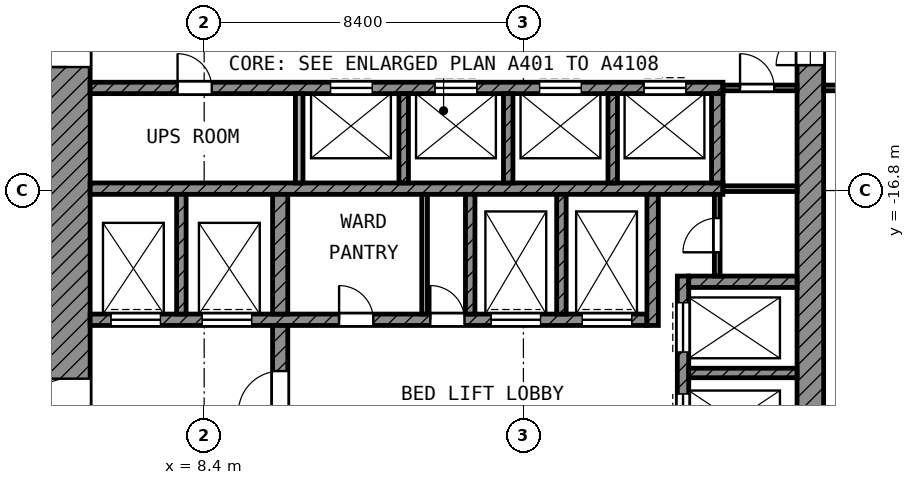
"""IFC4 building model, lengths in metres.
Left out: names, types, materials, properties, quantities, classifications, styles, units other than length and angle.
Written with IfcOpenShell. Run it as: python <this file> out.ifc"""

import sys

from ifc_helpers import new_model, si_unit, direction, frame, frame_2d, origin, place, context, subcontext, project, spatial, rectangle, extrude, element, fill, save


model = new_model("IFC4")
c1 = context("Model", 3, precision=1e-05, world=origin(), true_north=direction((0.0, 1.0)))
c2 = subcontext(c1, "Body", "Model", "MODEL_VIEW")
j1 = project(units=[si_unit("LENGTHUNIT", "METRE"), si_unit("PLANEANGLEUNIT", "RADIAN")], contexts=[c1])
p1 = place(None, origin())
s1 = spatial("IfcSite", under=j1, at=p1, CompositionType="ELEMENT")
p2 = place(p1, origin())
s2 = spatial("IfcBuilding", under=s1, at=p2, CompositionType="ELEMENT")
p3 = place(p2, frame((0.0, 0.0, 307.0)))
s3 = spatial("IfcBuildingStorey", under=s2, at=p3, CompositionType="ELEMENT", Elevation=307.0)
p4 = place(p3, frame((4.8, -24.7, 0.0), z_axis=(0.0, 0.0, 1.0), x_axis=(0.0, 1.0, 0.0)))
e1 = element("IfcWall", 1, at=p4, inside=s3, PredefinedType="SHEAR", context=c2, shape_type="SweptSolid", body=[
    extrude(rectangle(XDim=19.3, YDim=1.2, at=frame_2d((9.65, 0.0))), origin(), (0.0, 0.0, 1.0), 3.6),
])
p5 = place(p4, frame((11.15, 0.0, 0.0)))
e2 = element("IfcOpeningElement", 2, at=p5, cuts=e1, PredefinedType="OPENING", context=c2, shape_type="SweptSolid", body=[
    extrude(rectangle(XDim=1.1, YDim=2.1, at=frame_2d((0.55, 1.05))), frame((0.0, 0.61, 0.0), z_axis=(0.0, -1.0, 0.0), x_axis=(1.0, 0.0, 0.0)), (0.0, 0.0, 1.0), 1.22),
])
p6 = place(p4, frame((1.85, 0.0, 0.0)))
e3 = element("IfcOpeningElement", 3, at=p6, cuts=e1, PredefinedType="OPENING", context=c2, shape_type="SweptSolid", body=[
    extrude(rectangle(XDim=1.1, YDim=2.1, at=frame_2d((0.55, 1.05))), frame((0.0, 0.61, 0.0), z_axis=(0.0, -1.0, 0.0), x_axis=(1.0, 0.0, 0.0)), (0.0, 0.0, 1.0), 1.22),
])
p7 = place(p3, frame((24.35, -24.0, 0.0), z_axis=(0.0, 0.0, 1.0), x_axis=(0.0, 1.0, 0.0)))
e4 = element("IfcWall", 4, at=p7, inside=s3, PredefinedType="SHEAR", context=c2, shape_type="SweptSolid", body=[
    extrude(rectangle(XDim=18.6, YDim=0.7, at=frame_2d((9.3, 0.0))), origin(), (0.0, 0.0, 1.0), 3.6),
])
p8 = place(p7, frame((10.5, 0.0, 0.0)))
e5 = element("IfcOpeningElement", 5, at=p8, cuts=e4, PredefinedType="OPENING", context=c2, shape_type="SweptSolid", body=[
    extrude(rectangle(XDim=1.8, YDim=2.1, at=frame_2d((0.9, 1.05))), frame((0.0, 0.36, 0.0), z_axis=(0.0, -1.0, 0.0), x_axis=(1.0, 0.0, 0.0)), (0.0, 0.0, 1.0), 0.72),
])
p9 = place(p3, frame((5.4, -14.1, 0.0), z_axis=(0.0, 0.0, 1.0), x_axis=(1.0, 0.0, 0.0)))
e6 = element("IfcWall", 6, at=p9, inside=s3, PredefinedType="SHEAR", context=c2, shape_type="SweptSolid", body=[
    extrude(rectangle(XDim=16.65, YDim=0.3, at=frame_2d((8.325, 0.0))), origin(), (0.0, 0.0, 1.0), 3.6),
])
p10 = place(p9, frame((6.325, 0.0, 0.0)))
e7 = element("IfcOpeningElement", 7, at=p10, cuts=e6, PredefinedType="OPENING", context=c2, shape_type="SweptSolid", body=[
    extrude(rectangle(XDim=1.1, YDim=2.1, at=frame_2d((0.55, 1.05))), frame((0.0, 0.16, 0.0), z_axis=(0.0, -1.0, 0.0), x_axis=(1.0, 0.0, 0.0)), (0.0, 0.0, 1.0), 0.32),
])
p11 = place(p9, frame((9.075, 0.0, 0.0)))
e8 = element("IfcOpeningElement", 8, at=p11, cuts=e6, PredefinedType="OPENING", context=c2, shape_type="SweptSolid", body=[
    extrude(rectangle(XDim=1.1, YDim=2.1, at=frame_2d((0.55, 1.05))), frame((0.0, 0.16, 0.0), z_axis=(0.0, -1.0, 0.0), x_axis=(1.0, 0.0, 0.0)), (0.0, 0.0, 1.0), 0.32),
])
p12 = place(p9, frame((11.825, 0.0, 0.0)))
e9 = element("IfcOpeningElement", 9, at=p12, cuts=e6, PredefinedType="OPENING", context=c2, shape_type="SweptSolid", body=[
    extrude(rectangle(XDim=1.1, YDim=2.1, at=frame_2d((0.55, 1.05))), frame((0.0, 0.16, 0.0), z_axis=(0.0, -1.0, 0.0), x_axis=(1.0, 0.0, 0.0)), (0.0, 0.0, 1.0), 0.32),
])
p13 = place(p9, frame((14.575, 0.0, 0.0)))
e10 = element("IfcOpeningElement", 10, at=p13, cuts=e6, PredefinedType="OPENING", context=c2, shape_type="SweptSolid", body=[
    extrude(rectangle(XDim=1.1, YDim=2.1, at=frame_2d((0.55, 1.05))), frame((0.0, 0.16, 0.0), z_axis=(0.0, -1.0, 0.0), x_axis=(1.0, 0.0, 0.0)), (0.0, 0.0, 1.0), 0.32),
])
p14 = place(p9, frame((2.3, 0.0, 0.0)))
e11 = element("IfcOpeningElement", 11, at=p14, cuts=e6, PredefinedType="OPENING", context=c2, shape_type="SweptSolid", body=[
    extrude(rectangle(XDim=0.9, YDim=2.1, at=frame_2d((0.45, 1.05))), frame((0.0, 0.16, 0.0), z_axis=(0.0, -1.0, 0.0), x_axis=(1.0, 0.0, 0.0)), (0.0, 0.0, 1.0), 0.32),
])
p15 = place(p3, frame((5.4, -16.75, 0.0), z_axis=(0.0, 0.0, 1.0), x_axis=(1.0, 0.0, 0.0)))
e12 = element("IfcWall", 12, at=p15, inside=s3, PredefinedType="SHEAR", context=c2, shape_type="SweptSolid", body=[
    extrude(rectangle(XDim=16.65, YDim=0.3, at=frame_2d((8.325, 0.0))), origin(), (0.0, 0.0, 1.0), 3.6),
])
p16 = place(p3, frame((5.4, -20.2, 0.0), z_axis=(0.0, 0.0, 1.0), x_axis=(1.0, 0.0, 0.0)))
e13 = element("IfcWall", 13, at=p16, inside=s3, PredefinedType="SHEAR", context=c2, shape_type="SweptSolid", body=[
    extrude(rectangle(XDim=14.65, YDim=0.3, at=frame_2d((7.325, 0.0))), origin(), (0.0, 0.0, 1.0), 3.6),
])
p17 = place(p16, frame((10.55, 0.0, 0.0)))
e14 = element("IfcOpeningElement", 14, at=p17, cuts=e13, PredefinedType="OPENING", context=c2, shape_type="SweptSolid", body=[
    extrude(rectangle(XDim=1.3, YDim=2.1, at=frame_2d((0.65, 1.05))), frame((0.0, 0.16, 0.0), z_axis=(0.0, -1.0, 0.0), x_axis=(1.0, 0.0, 0.0)), (0.0, 0.0, 1.0), 0.32),
])
p18 = place(p16, frame((12.95, 0.0, 0.0)))
e15 = element("IfcOpeningElement", 15, at=p18, cuts=e13, PredefinedType="OPENING", context=c2, shape_type="SweptSolid", body=[
    extrude(rectangle(XDim=1.3, YDim=2.1, at=frame_2d((0.65, 1.05))), frame((0.0, 0.16, 0.0), z_axis=(0.0, -1.0, 0.0), x_axis=(1.0, 0.0, 0.0)), (0.0, 0.0, 1.0), 0.32),
])
p19 = place(p16, frame((0.55, 0.0, 0.0)))
e16 = element("IfcOpeningElement", 16, at=p19, cuts=e13, PredefinedType="OPENING", context=c2, shape_type="SweptSolid", body=[
    extrude(rectangle(XDim=1.3, YDim=2.1, at=frame_2d((0.65, 1.05))), frame((0.0, 0.16, 0.0), z_axis=(0.0, -1.0, 0.0), x_axis=(1.0, 0.0, 0.0)), (0.0, 0.0, 1.0), 0.32),
])
p20 = place(p16, frame((2.95, 0.0, 0.0)))
e17 = element("IfcOpeningElement", 17, at=p20, cuts=e13, PredefinedType="OPENING", context=c2, shape_type="SweptSolid", body=[
    extrude(rectangle(XDim=1.3, YDim=2.1, at=frame_2d((0.65, 1.05))), frame((0.0, 0.16, 0.0), z_axis=(0.0, -1.0, 0.0), x_axis=(1.0, 0.0, 0.0)), (0.0, 0.0, 1.0), 0.32),
])
p21 = place(p16, frame((6.55, 0.0, 0.0)))
e18 = element("IfcOpeningElement", 18, at=p21, cuts=e13, PredefinedType="OPENING", context=c2, shape_type="SweptSolid", body=[
    extrude(rectangle(XDim=0.9, YDim=2.1, at=frame_2d((0.45, 1.05))), frame((0.0, 0.16, 0.0), z_axis=(0.0, -1.0, 0.0), x_axis=(1.0, 0.0, 0.0)), (0.0, 0.0, 1.0), 0.32),
])
p22 = place(p16, frame((8.95, 0.0, 0.0)))
e19 = element("IfcOpeningElement", 19, at=p22, cuts=e13, PredefinedType="OPENING", context=c2, shape_type="SweptSolid", body=[
    extrude(rectangle(XDim=0.9, YDim=2.1, at=frame_2d((0.45, 1.05))), frame((0.0, 0.16, 0.0), z_axis=(0.0, -1.0, 0.0), x_axis=(1.0, 0.0, 0.0)), (0.0, 0.0, 1.0), 0.32),
])
p23 = place(p3, frame((10.4, -24.0, 0.0), z_axis=(0.0, 0.0, 1.0), x_axis=(0.0, 1.0, 0.0)))
e20 = element("IfcWall", 20, at=p23, inside=s3, PredefinedType="SHEAR", context=c2, shape_type="SweptSolid", body=[
    extrude(rectangle(XDim=3.65, YDim=0.4, at=frame_2d((1.825, 0.0))), origin(), (0.0, 0.0, 1.0), 3.6),
])
p24 = place(p23, frame((1.35, 0.0, 0.0)))
e21 = element("IfcOpeningElement", 21, at=p24, cuts=e20, PredefinedType="OPENING", context=c2, shape_type="SweptSolid", body=[
    extrude(rectangle(XDim=1.1, YDim=2.1, at=frame_2d((0.55, 1.05))), frame((0.0, 0.21, 0.0), z_axis=(0.0, -1.0, 0.0), x_axis=(1.0, 0.0, 0.0)), (0.0, 0.0, 1.0), 0.42),
])
p25 = place(p3, frame((10.4, -20.05, 0.0), z_axis=(0.0, 0.0, 1.0), x_axis=(0.0, 1.0, 0.0)))
e22 = element("IfcWall", 22, at=p25, inside=s3, PredefinedType="SHEAR", context=c2, shape_type="SweptSolid", body=[
    extrude(rectangle(XDim=3.15, YDim=0.4, at=frame_2d((1.575, 0.0))), origin(), (0.0, 0.0, 1.0), 3.6),
])
p26 = place(p3, frame((20.2, -20.35, 0.0), z_axis=(0.0, 0.0, 1.0), x_axis=(0.0, 1.0, 0.0)))
e23 = element("IfcWall", 23, at=p26, inside=s3, PredefinedType="SHEAR", context=c2, shape_type="SweptSolid", body=[
    extrude(rectangle(XDim=3.45, YDim=0.3, at=frame_2d((1.725, 0.0))), origin(), (0.0, 0.0, 1.0), 3.6),
])
p27 = place(p3, frame((21.9, -16.6, 0.0), z_axis=(0.0, 0.0, 1.0), x_axis=(0.0, 1.0, 0.0)))
e24 = element("IfcWall", 24, at=p27, inside=s3, PredefinedType="SHEAR", context=c2, shape_type="SweptSolid", body=[
    extrude(rectangle(XDim=2.35, YDim=0.3, at=frame_2d((1.175, 0.0))), origin(), (0.0, 0.0, 1.0), 3.6),
])
p28 = place(p3, frame((21.15, -19.2, 0.0), z_axis=(0.0, 0.0, 1.0), x_axis=(1.0, 0.0, 0.0)))
e25 = element("IfcWall", 25, at=p28, inside=s3, PredefinedType="SHEAR", context=c2, shape_type="SweptSolid", body=[
    extrude(rectangle(XDim=2.85, YDim=0.3, at=frame_2d((1.425, 0.0))), origin(), (0.0, 0.0, 1.0), 3.6),
])
p29 = place(p3, frame((21.0, -24.0, 0.0), z_axis=(0.0, 0.0, 1.0), x_axis=(0.0, 1.0, 0.0)))
e26 = element("IfcWall", 26, at=p29, inside=s3, PredefinedType="SHEAR", context=c2, shape_type="SweptSolid", body=[
    extrude(rectangle(XDim=4.95, YDim=0.3, at=frame_2d((2.475, 0.0))), origin(), (0.0, 0.0, 1.0), 3.6),
])
p30 = place(p29, frame((2.95, 0.0, 0.0)))
e27 = element("IfcOpeningElement", 27, at=p30, cuts=e26, PredefinedType="OPENING", context=c2, shape_type="SweptSolid", body=[
    extrude(rectangle(XDim=1.3, YDim=2.1, at=frame_2d((0.65, 1.05))), frame((0.0, 0.16, 0.0), z_axis=(0.0, -1.0, 0.0), x_axis=(1.0, 0.0, 0.0)), (0.0, 0.0, 1.0), 0.32),
])
p31 = place(p29, frame((0.55, 0.0, 0.0)))
e28 = element("IfcOpeningElement", 28, at=p31, cuts=e26, PredefinedType="OPENING", context=c2, shape_type="SweptSolid", body=[
    extrude(rectangle(XDim=1.3, YDim=2.1, at=frame_2d((0.65, 1.05))), frame((0.0, 0.16, 0.0), z_axis=(0.0, -1.0, 0.0), x_axis=(1.0, 0.0, 0.0)), (0.0, 0.0, 1.0), 0.32),
])
p32 = place(p3, frame((21.15, -21.6, 0.0), z_axis=(0.0, 0.0, 1.0), x_axis=(1.0, 0.0, 0.0)))
e29 = element("IfcWall", 29, at=p32, inside=s3, PredefinedType="SHEAR", context=c2, shape_type="SweptSolid", body=[
    extrude(rectangle(XDim=2.85, YDim=0.25, at=frame_2d((1.425, 0.0))), origin(), (0.0, 0.0, 1.0), 3.6),
])
for number, where, z_axis, x_axis in (
    (30, (7.8, -20.05, 0.0), (0.0, 0.0, 1.0), (0.0, 1.0, 0.0)),
    (31, (15.4, -20.05, 0.0), (0.0, 0.0, 1.0), (0.0, 1.0, 0.0)),
    (32, (17.8, -20.05, 0.0), (0.0, 0.0, 1.0), (0.0, 1.0, 0.0)),
):
    element("IfcWall", number, at=place(p3, frame(where, z_axis=z_axis, x_axis=x_axis)), inside=s3, PredefinedType="SHEAR", context=c2, shape_type="SweptSolid", body=[
        extrude(rectangle(XDim=3.15, YDim=0.25, at=frame_2d((1.575, 0.0))), origin(), (0.0, 0.0, 1.0), 3.6),
    ])
p33 = place(p3, frame((10.9, -16.6, 0.0), z_axis=(0.0, 0.0, 1.0), x_axis=(0.0, 1.0, 0.0)))
e33 = element("IfcWall", 33, at=p33, inside=s3, PredefinedType="PARTITIONING", context=c2, shape_type="SweptSolid", body=[
    extrude(rectangle(XDim=2.35, YDim=0.2, at=frame_2d((1.175, 0.0))), origin(), (0.0, 0.0, 1.0), 3.6),
])
for number, where, z_axis, x_axis in (
    (34, (13.65, -16.6, 0.0), (0.0, 0.0, 1.0), (0.0, 1.0, 0.0)),
    (35, (16.4, -16.6, 0.0), (0.0, 0.0, 1.0), (0.0, 1.0, 0.0)),
    (36, (19.15, -16.6, 0.0), (0.0, 0.0, 1.0), (0.0, 1.0, 0.0)),
):
    element("IfcWall", number, at=place(p3, frame(where, z_axis=z_axis, x_axis=x_axis)), inside=s3, PredefinedType="SHEAR", context=c2, shape_type="SweptSolid", body=[
        extrude(rectangle(XDim=2.35, YDim=0.25, at=frame_2d((1.175, 0.0))), origin(), (0.0, 0.0, 1.0), 3.6),
    ])
p34 = place(p3, frame((21.9, -19.05, 0.0), z_axis=(0.0, 0.0, 1.0), x_axis=(0.0, 1.0, 0.0)))
e37 = element("IfcWall", 37, at=p34, inside=s3, PredefinedType="PARTITIONING", context=c2, shape_type="SweptSolid", body=[
    extrude(rectangle(XDim=2.15, YDim=0.15, at=frame_2d((1.075, 0.0))), origin(), (0.0, 0.0, 1.0), 3.6),
])
p35 = place(p34, frame((0.625, 0.0, 0.0)))
e38 = element("IfcOpeningElement", 38, at=p35, cuts=e37, PredefinedType="OPENING", context=c2, shape_type="SweptSolid", body=[
    extrude(rectangle(XDim=0.9, YDim=2.1, at=frame_2d((0.45, 1.05))), frame((0.0, 0.085, 0.0), z_axis=(0.0, -1.0, 0.0), x_axis=(1.0, 0.0, 0.0)), (0.0, 0.0, 1.0), 0.17),
])
p36 = place(p3, frame((22.05, -16.75, 0.0), z_axis=(0.0, 0.0, 1.0), x_axis=(1.0, 0.0, 0.0)))
e39 = element("IfcWall", 39, at=p36, inside=s3, PredefinedType="PARTITIONING", context=c2, shape_type="SweptSolid", body=[
    extrude(rectangle(XDim=1.95, YDim=0.15, at=frame_2d((0.975, 0.0))), origin(), (0.0, 0.0, 1.0), 3.6),
])
p37 = place(p3, frame((22.05, -14.1, 0.0), z_axis=(0.0, 0.0, 1.0), x_axis=(1.0, 0.0, 0.0)))
e40 = element("IfcWall", 40, at=p37, inside=s3, PredefinedType="PARTITIONING", context=c2, shape_type="SweptSolid", body=[
    extrude(rectangle(XDim=1.95, YDim=0.15, at=frame_2d((0.975, 0.0))), origin(), (0.0, 0.0, 1.0), 3.6),
])
p38 = place(p37, frame((0.45, 0.0, 0.0)))
e41 = element("IfcOpeningElement", 41, at=p38, cuts=e40, PredefinedType="OPENING", context=c2, shape_type="SweptSolid", body=[
    extrude(rectangle(XDim=0.9, YDim=2.1, at=frame_2d((0.45, 1.05))), frame((0.0, 0.085, 0.0), z_axis=(0.0, -1.0, 0.0), x_axis=(1.0, 0.0, 0.0)), (0.0, 0.0, 1.0), 0.17),
])
p39 = place(p3, frame((14.2, -20.05, 0.0), z_axis=(0.0, 0.0, 1.0), x_axis=(0.0, 1.0, 0.0)))
e42 = element("IfcWall", 42, at=p39, inside=s3, PredefinedType="PARTITIONING", context=c2, shape_type="SweptSolid", body=[
    extrude(rectangle(XDim=3.15, YDim=0.15, at=frame_2d((1.575, 0.0))), origin(), (0.0, 0.0, 1.0), 3.6),
])
p40 = place(p3, frame((24.7, -14.1, 0.0), z_axis=(0.0, 0.0, 1.0), x_axis=(1.0, 0.0, 0.0)))
e43 = element("IfcWall", 43, at=p40, inside=s3, PredefinedType="PARTITIONING", context=c2, shape_type="SweptSolid", body=[
    extrude(rectangle(XDim=4.625, YDim=0.15, at=frame_2d((2.312, 0.0))), origin(), (0.0, 0.0, 1.0), 3.6),
])
p41 = place(p40, frame((1.85, 0.0, 0.0)))
e44 = element("IfcOpeningElement", 44, at=p41, cuts=e43, PredefinedType="OPENING", context=c2, shape_type="SweptSolid", body=[
    extrude(rectangle(XDim=1.5, YDim=2.1, at=frame_2d((0.75, 1.05))), frame((0.0, 0.085, 0.0), z_axis=(0.0, -1.0, 0.0), x_axis=(1.0, 0.0, 0.0)), (0.0, 0.0, 1.0), 0.17),
])
p42 = place(p10, origin())
e45 = element("IfcDoor", 45, at=p42, inside=s3, OperationType="DOUBLE_DOOR_SLIDING", PredefinedType="DOOR", context=c2, shape_type="SweptSolid", body=[
    extrude(rectangle(XDim=1.1, YDim=2.1, at=frame_2d((0.55, 1.05))), frame((0.0, 0.025, 0.0), z_axis=(0.0, -1.0, 0.0), x_axis=(1.0, 0.0, 0.0)), (0.0, 0.0, 1.0), 0.05),
])
fill(e7, e45)
p43 = place(p11, origin())
e46 = element("IfcDoor", 46, at=p43, inside=s3, OperationType="DOUBLE_DOOR_SLIDING", PredefinedType="DOOR", context=c2, shape_type="SweptSolid", body=[
    extrude(rectangle(XDim=1.1, YDim=2.1, at=frame_2d((0.55, 1.05))), frame((0.0, 0.025, 0.0), z_axis=(0.0, -1.0, 0.0), x_axis=(1.0, 0.0, 0.0)), (0.0, 0.0, 1.0), 0.05),
])
fill(e8, e46)
p44 = place(p12, origin())
e47 = element("IfcDoor", 47, at=p44, inside=s3, OperationType="DOUBLE_DOOR_SLIDING", PredefinedType="DOOR", context=c2, shape_type="SweptSolid", body=[
    extrude(rectangle(XDim=1.1, YDim=2.1, at=frame_2d((0.55, 1.05))), frame((0.0, 0.025, 0.0), z_axis=(0.0, -1.0, 0.0), x_axis=(1.0, 0.0, 0.0)), (0.0, 0.0, 1.0), 0.05),
])
fill(e9, e47)
p45 = place(p13, origin())
e48 = element("IfcDoor", 48, at=p45, inside=s3, OperationType="DOUBLE_DOOR_SLIDING", PredefinedType="DOOR", context=c2, shape_type="SweptSolid", body=[
    extrude(rectangle(XDim=1.1, YDim=2.1, at=frame_2d((0.55, 1.05))), frame((0.0, 0.025, 0.0), z_axis=(0.0, -1.0, 0.0), x_axis=(1.0, 0.0, 0.0)), (0.0, 0.0, 1.0), 0.05),
])
fill(e10, e48)
p46 = place(p30, origin())
e49 = element("IfcDoor", 49, at=p46, inside=s3, OperationType="DOUBLE_DOOR_SLIDING", PredefinedType="DOOR", context=c2, shape_type="SweptSolid", body=[
    extrude(rectangle(XDim=1.3, YDim=2.1, at=frame_2d((0.65, 1.05))), frame((0.0, 0.025, 0.0), z_axis=(0.0, -1.0, 0.0), x_axis=(1.0, 0.0, 0.0)), (0.0, 0.0, 1.0), 0.05),
])
fill(e27, e49)
p47 = place(p31, origin())
e50 = element("IfcDoor", 50, at=p47, inside=s3, OperationType="DOUBLE_DOOR_SLIDING", PredefinedType="DOOR", context=c2, shape_type="SweptSolid", body=[
    extrude(rectangle(XDim=1.3, YDim=2.1, at=frame_2d((0.65, 1.05))), frame((0.0, 0.025, 0.0), z_axis=(0.0, -1.0, 0.0), x_axis=(1.0, 0.0, 0.0)), (0.0, 0.0, 1.0), 0.05),
])
fill(e28, e50)
p48 = place(p17, origin())
e51 = element("IfcDoor", 51, at=p48, inside=s3, OperationType="DOUBLE_DOOR_SLIDING", PredefinedType="DOOR", context=c2, shape_type="SweptSolid", body=[
    extrude(rectangle(XDim=1.3, YDim=2.1, at=frame_2d((0.65, 1.05))), frame((0.0, 0.025, 0.0), z_axis=(0.0, -1.0, 0.0), x_axis=(1.0, 0.0, 0.0)), (0.0, 0.0, 1.0), 0.05),
])
fill(e14, e51)
p49 = place(p18, origin())
e52 = element("IfcDoor", 52, at=p49, inside=s3, OperationType="DOUBLE_DOOR_SLIDING", PredefinedType="DOOR", context=c2, shape_type="SweptSolid", body=[
    extrude(rectangle(XDim=1.3, YDim=2.1, at=frame_2d((0.65, 1.05))), frame((0.0, 0.025, 0.0), z_axis=(0.0, -1.0, 0.0), x_axis=(1.0, 0.0, 0.0)), (0.0, 0.0, 1.0), 0.05),
])
fill(e15, e52)
p50 = place(p19, origin())
e53 = element("IfcDoor", 53, at=p50, inside=s3, OperationType="DOUBLE_DOOR_SLIDING", PredefinedType="DOOR", context=c2, shape_type="SweptSolid", body=[
    extrude(rectangle(XDim=1.3, YDim=2.1, at=frame_2d((0.65, 1.05))), frame((0.0, 0.025, 0.0), z_axis=(0.0, -1.0, 0.0), x_axis=(1.0, 0.0, 0.0)), (0.0, 0.0, 1.0), 0.05),
])
fill(e16, e53)
p51 = place(p20, origin())
e54 = element("IfcDoor", 54, at=p51, inside=s3, OperationType="DOUBLE_DOOR_SLIDING", PredefinedType="DOOR", context=c2, shape_type="SweptSolid", body=[
    extrude(rectangle(XDim=1.3, YDim=2.1, at=frame_2d((0.65, 1.05))), frame((0.0, 0.025, 0.0), z_axis=(0.0, -1.0, 0.0), x_axis=(1.0, 0.0, 0.0)), (0.0, 0.0, 1.0), 0.05),
])
fill(e17, e54)
p52 = place(p5, origin())
e55 = element("IfcDoor", 55, at=p52, inside=s3, OperationType="SINGLE_SWING_LEFT", PredefinedType="DOOR", context=c2, shape_type="SweptSolid", body=[
    extrude(rectangle(XDim=1.1, YDim=2.1, at=frame_2d((0.55, 1.05))), frame((0.0, 0.025, 0.0), z_axis=(0.0, -1.0, 0.0), x_axis=(1.0, 0.0, 0.0)), (0.0, 0.0, 1.0), 0.05),
])
fill(e2, e55)
p53 = place(p6, origin())
e56 = element("IfcDoor", 56, at=p53, inside=s3, OperationType="SINGLE_SWING_LEFT", PredefinedType="DOOR", context=c2, shape_type="SweptSolid", body=[
    extrude(rectangle(XDim=1.1, YDim=2.1, at=frame_2d((0.55, 1.05))), frame((0.0, 0.025, 0.0), z_axis=(0.0, -1.0, 0.0), x_axis=(1.0, 0.0, 0.0)), (0.0, 0.0, 1.0), 0.05),
])
fill(e3, e56)
p54 = place(p24, origin())
e57 = element("IfcDoor", 57, at=p54, inside=s3, OperationType="SINGLE_SWING_LEFT", PredefinedType="DOOR", context=c2, shape_type="SweptSolid", body=[
    extrude(rectangle(XDim=1.1, YDim=2.1, at=frame_2d((0.55, 1.05))), frame((0.0, 0.025, 0.0), z_axis=(0.0, -1.0, 0.0), x_axis=(1.0, 0.0, 0.0)), (0.0, 0.0, 1.0), 0.05),
])
fill(e21, e57)
p55 = place(p8, origin())
e58 = element("IfcDoor", 58, at=p55, inside=s3, OperationType="DOUBLE_DOOR_SINGLE_SWING", PredefinedType="DOOR", context=c2, shape_type="SweptSolid", body=[
    extrude(rectangle(XDim=1.8, YDim=2.1, at=frame_2d((0.9, 1.05))), frame((0.0, 0.025, 0.0), z_axis=(0.0, -1.0, 0.0), x_axis=(1.0, 0.0, 0.0)), (0.0, 0.0, 1.0), 0.05),
])
fill(e5, e58)
p56 = place(p38, origin())
e59 = element("IfcDoor", 59, at=p56, inside=s3, OperationType="SINGLE_SWING_LEFT", PredefinedType="DOOR", context=c2, shape_type="SweptSolid", body=[
    extrude(rectangle(XDim=0.9, YDim=2.1, at=frame_2d((0.45, 1.05))), frame((0.0, 0.025, 0.0), z_axis=(0.0, -1.0, 0.0), x_axis=(1.0, 0.0, 0.0)), (0.0, 0.0, 1.0), 0.05),
])
fill(e41, e59)
p57 = place(p35, origin())
e60 = element("IfcDoor", 60, at=p57, inside=s3, OperationType="SINGLE_SWING_LEFT", PredefinedType="DOOR", context=c2, shape_type="SweptSolid", body=[
    extrude(rectangle(XDim=0.9, YDim=2.1, at=frame_2d((0.45, 1.05))), frame((0.0, 0.025, 0.0), z_axis=(0.0, -1.0, 0.0), x_axis=(1.0, 0.0, 0.0)), (0.0, 0.0, 1.0), 0.05),
])
fill(e38, e60)
p58 = place(p21, origin())
e61 = element("IfcDoor", 61, at=p58, inside=s3, OperationType="SINGLE_SWING_LEFT", PredefinedType="DOOR", context=c2, shape_type="SweptSolid", body=[
    extrude(rectangle(XDim=0.9, YDim=2.1, at=frame_2d((0.45, 1.05))), frame((0.0, 0.025, 0.0), z_axis=(0.0, -1.0, 0.0), x_axis=(1.0, 0.0, 0.0)), (0.0, 0.0, 1.0), 0.05),
])
fill(e18, e61)
p59 = place(p22, origin())
e62 = element("IfcDoor", 62, at=p59, inside=s3, OperationType="SINGLE_SWING_LEFT", PredefinedType="DOOR", context=c2, shape_type="SweptSolid", body=[
    extrude(rectangle(XDim=0.9, YDim=2.1, at=frame_2d((0.45, 1.05))), frame((0.0, 0.025, 0.0), z_axis=(0.0, -1.0, 0.0), x_axis=(1.0, 0.0, 0.0)), (0.0, 0.0, 1.0), 0.05),
])
fill(e19, e62)
p60 = place(p14, origin())
e63 = element("IfcDoor", 63, at=p60, inside=s3, OperationType="SINGLE_SWING_LEFT", PredefinedType="DOOR", context=c2, shape_type="SweptSolid", body=[
    extrude(rectangle(XDim=0.9, YDim=2.1, at=frame_2d((0.45, 1.05))), frame((0.0, 0.025, 0.0), z_axis=(0.0, -1.0, 0.0), x_axis=(1.0, 0.0, 0.0)), (0.0, 0.0, 1.0), 0.05),
])
fill(e11, e63)
save(model, sys.argv[1])
